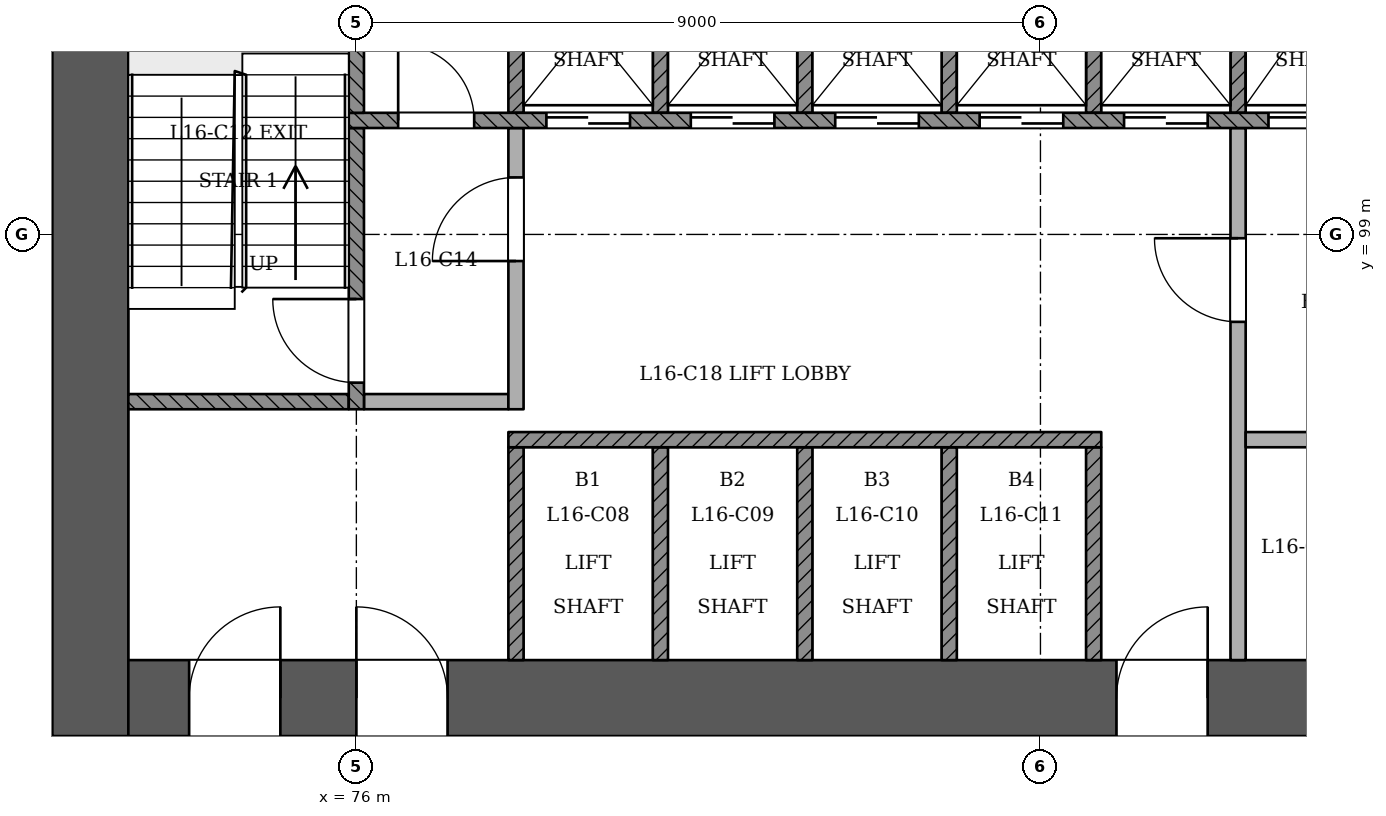
"""IFC4 building model, lengths in metres.
Left out: names, types, materials, properties, quantities, classifications, styles, units other than length and angle.
Written with IfcOpenShell. Run it as: python <this file> out.ifc"""

import sys

from ifc_helpers import new_model, si_unit, direction, frame, frame_2d, origin, place, context, subcontext, project, spatial, rectangle, extrude, element, fill, save


model = new_model("IFC4")
c1 = context("Model", 3, precision=1e-05, world=origin(), true_north=direction((0.0, 1.0)))
c2 = subcontext(c1, "Body", "Model", "MODEL_VIEW")
j1 = project(units=[si_unit("LENGTHUNIT", "METRE"), si_unit("PLANEANGLEUNIT", "RADIAN")], contexts=[c1])
p1 = place(None, origin())
s1 = spatial("IfcSite", under=j1, at=p1, CompositionType="ELEMENT")
p2 = place(p1, origin())
s2 = spatial("IfcBuilding", under=s1, at=p2, CompositionType="ELEMENT")
p3 = place(p2, frame((0.0, 0.0, 66.6)))
s3 = spatial("IfcBuildingStorey", under=s2, at=p3, CompositionType="ELEMENT", Elevation=66.6)
p4 = place(p3, frame((72.5, 92.9, 0.0), z_axis=(0.0, 0.0, 1.0), x_axis=(1.0, 0.0, 0.0)))
e1 = element("IfcWall", 1, at=p4, inside=s3, PredefinedType="SHEAR", context=c2, shape_type="SweptSolid", body=[
    extrude(rectangle(XDim=25.5, YDim=1.0, at=frame_2d((12.75, 0.0))), origin(), (0.0, 0.0, 1.0), 3.6),
])
p5 = place(p4, frame((1.3, 0.0, 0.0)))
e2 = element("IfcOpeningElement", 2, at=p5, cuts=e1, PredefinedType="OPENING", context=c2, shape_type="SweptSolid", body=[
    extrude(rectangle(XDim=1.2, YDim=2.1, at=frame_2d((0.6, 1.05))), frame((0.0, 0.51, 0.0), z_axis=(0.0, -1.0, 0.0), x_axis=(1.0, 0.0, 0.0)), (0.0, 0.0, 1.0), 1.021),
])
p6 = place(p4, frame((3.5, 0.0, 0.0)))
e3 = element("IfcOpeningElement", 3, at=p6, cuts=e1, PredefinedType="OPENING", context=c2, shape_type="SweptSolid", body=[
    extrude(rectangle(XDim=1.2, YDim=2.1, at=frame_2d((0.6, 1.05))), frame((0.0, 0.51, 0.0), z_axis=(0.0, -1.0, 0.0), x_axis=(1.0, 0.0, 0.0)), (0.0, 0.0, 1.0), 1.021),
])
p7 = place(p4, frame((13.5, 0.0, 0.0)))
e4 = element("IfcOpeningElement", 4, at=p7, cuts=e1, PredefinedType="OPENING", context=c2, shape_type="SweptSolid", body=[
    extrude(rectangle(XDim=1.2, YDim=2.1, at=frame_2d((0.6, 1.05))), frame((0.0, 0.51, 0.0), z_axis=(0.0, -1.0, 0.0), x_axis=(1.0, 0.0, 0.0)), (0.0, 0.0, 1.0), 1.021),
])
p8 = place(p4, frame((16.363, 0.0, 0.0)))
e5 = element("IfcOpeningElement", 5, at=p8, cuts=e1, PredefinedType="OPENING", context=c2, shape_type="SweptSolid", body=[
    extrude(rectangle(XDim=1.0, YDim=2.1, at=frame_2d((0.5, 1.05))), frame((0.0, 0.51, 0.0), z_axis=(0.0, -1.0, 0.0), x_axis=(1.0, 0.0, 0.0)), (0.0, 0.0, 1.0), 1.021),
])
p9 = place(p4, frame((19.8, 0.0, 0.0)))
e6 = element("IfcOpeningElement", 6, at=p9, cuts=e1, PredefinedType="OPENING", context=c2, shape_type="SweptSolid", body=[
    extrude(rectangle(XDim=1.0, YDim=2.1, at=frame_2d((0.5, 1.05))), frame((0.0, 0.51, 0.0), z_axis=(0.0, -1.0, 0.0), x_axis=(1.0, 0.0, 0.0)), (0.0, 0.0, 1.0), 1.021),
])
p10 = place(p4, frame((22.788, 0.0, 0.0)))
e7 = element("IfcOpeningElement", 7, at=p10, cuts=e1, PredefinedType="OPENING", context=c2, shape_type="SweptSolid", body=[
    extrude(rectangle(XDim=1.0, YDim=2.1, at=frame_2d((0.5, 1.05))), frame((0.0, 0.51, 0.0), z_axis=(0.0, -1.0, 0.0), x_axis=(1.0, 0.0, 0.0)), (0.0, 0.0, 1.0), 1.021),
])
p11 = place(p3, frame((72.5, 103.9, 0.0), z_axis=(0.0, 0.0, 1.0), x_axis=(0.0, -1.0, 0.0)))
e8 = element("IfcWall", 8, at=p11, inside=s3, PredefinedType="SHEAR", context=c2, shape_type="SweptSolid", body=[
    extrude(rectangle(XDim=11.5, YDim=1.0, at=frame_2d((5.75, 0.0))), origin(), (0.0, 0.0, 1.0), 3.6),
])
p12 = place(p3, frame((62.458, 97.093, 0.0), z_axis=(0.0, 0.0, 1.0), x_axis=(0.499998802074, -0.866026095406, 0.0)))
e9 = element("IfcWall", 9, at=p12, inside=s3, PredefinedType="PARTITIONING", context=c2, shape_type="SweptSolid", body=[
    extrude(rectangle(XDim=43.437, YDim=0.15, at=frame_2d((21.719, 0.0))), origin(), (0.0, 0.0, 1.0), 2.7),
])
p13 = place(p12, frame((0.286, 0.0, 0.0)))
e10 = element("IfcOpeningElement", 10, at=p13, cuts=e9, PredefinedType="OPENING", context=c2, shape_type="SweptSolid", body=[
    extrude(rectangle(XDim=1.2, YDim=2.1, at=frame_2d((0.6, 1.05))), frame((0.0, 0.085, 0.0), z_axis=(0.0, -1.0, 0.0), x_axis=(1.0, 0.0, 0.0)), (0.0, 0.0, 1.0), 0.171),
])
p14 = place(p12, frame((12.13, 0.0, 0.0)))
e11 = element("IfcOpeningElement", 11, at=p14, cuts=e9, PredefinedType="OPENING", context=c2, shape_type="SweptSolid", body=[
    extrude(rectangle(XDim=1.2, YDim=2.1, at=frame_2d((0.6, 1.05))), frame((0.0, 0.085, 0.0), z_axis=(0.0, -1.0, 0.0), x_axis=(1.0, 0.0, 0.0)), (0.0, 0.0, 1.0), 0.171),
])
p15 = place(p12, frame((18.98, 0.0, 0.0)))
e12 = element("IfcOpeningElement", 12, at=p15, cuts=e9, PredefinedType="OPENING", context=c2, shape_type="SweptSolid", body=[
    extrude(rectangle(XDim=1.0, YDim=2.1, at=frame_2d((0.5, 1.05))), frame((0.0, 0.085, 0.0), z_axis=(0.0, -1.0, 0.0), x_axis=(1.0, 0.0, 0.0)), (0.0, 0.0, 1.0), 0.171),
])
p16 = place(p12, frame((27.88, 0.0, 0.0)))
e13 = element("IfcOpeningElement", 13, at=p16, cuts=e9, PredefinedType="OPENING", context=c2, shape_type="SweptSolid", body=[
    extrude(rectangle(XDim=1.2, YDim=2.1, at=frame_2d((0.6, 1.05))), frame((0.0, 0.085, 0.0), z_axis=(0.0, -1.0, 0.0), x_axis=(1.0, 0.0, 0.0)), (0.0, 0.0, 1.0), 0.171),
])
p17 = place(p12, frame((38.745, 0.0, 0.0)))
e14 = element("IfcOpeningElement", 14, at=p17, cuts=e9, PredefinedType="OPENING", context=c2, shape_type="SweptSolid", body=[
    extrude(rectangle(XDim=1.2, YDim=2.1, at=frame_2d((0.6, 1.05))), frame((0.0, 0.085, 0.0), z_axis=(0.0, -1.0, 0.0), x_axis=(1.0, 0.0, 0.0)), (0.0, 0.0, 1.0), 0.171),
])
p18 = place(p3, frame((85.824, 59.475, 0.0), z_axis=(0.0, 0.0, 1.0), x_axis=(0.499998498473, 0.86602627069, 0.0)))
e15 = element("IfcWall", 15, at=p18, inside=s3, PredefinedType="PARTITIONING", context=c2, shape_type="SweptSolid", body=[
    extrude(rectangle(XDim=42.924, YDim=0.15, at=frame_2d((21.462, 0.0))), origin(), (0.0, 0.0, 1.0), 2.7),
])
p19 = place(p18, frame((3.492, 0.0, 0.0)))
e16 = element("IfcOpeningElement", 16, at=p19, cuts=e15, PredefinedType="OPENING", context=c2, shape_type="SweptSolid", body=[
    extrude(rectangle(XDim=1.2, YDim=2.1, at=frame_2d((0.6, 1.05))), frame((0.0, 0.085, 0.0), z_axis=(0.0, -1.0, 0.0), x_axis=(1.0, 0.0, 0.0)), (0.0, 0.0, 1.0), 0.171),
])
p20 = place(p18, frame((14.357, 0.0, 0.0)))
e17 = element("IfcOpeningElement", 17, at=p20, cuts=e15, PredefinedType="OPENING", context=c2, shape_type="SweptSolid", body=[
    extrude(rectangle(XDim=1.2, YDim=2.1, at=frame_2d((0.6, 1.05))), frame((0.0, 0.085, 0.0), z_axis=(0.0, -1.0, 0.0), x_axis=(1.0, 0.0, 0.0)), (0.0, 0.0, 1.0), 0.171),
])
p21 = place(p18, frame((27.857, 0.0, 0.0)))
e18 = element("IfcOpeningElement", 18, at=p21, cuts=e15, PredefinedType="OPENING", context=c2, shape_type="SweptSolid", body=[
    extrude(rectangle(XDim=1.2, YDim=2.1, at=frame_2d((0.6, 1.05))), frame((0.0, 0.085, 0.0), z_axis=(0.0, -1.0, 0.0), x_axis=(1.0, 0.0, 0.0)), (0.0, 0.0, 1.0), 0.171),
])
p22 = place(p18, frame((38.721, 0.0, 0.0)))
e19 = element("IfcOpeningElement", 19, at=p22, cuts=e15, PredefinedType="OPENING", context=c2, shape_type="SweptSolid", body=[
    extrude(rectangle(XDim=1.2, YDim=2.1, at=frame_2d((0.6, 1.05))), frame((0.0, 0.085, 0.0), z_axis=(0.0, -1.0, 0.0), x_axis=(1.0, 0.0, 0.0)), (0.0, 0.0, 1.0), 0.171),
])
for number, where, z_axis, x_axis in (
    (20, (78.1, 93.4, 0.0), (0.0, 0.0, 1.0), (0.0, 1.0, 0.0)),
    (21, (80.0, 93.4, 0.0), (0.0, 0.0, 1.0), (0.0, 1.0, 0.0)),
    (22, (81.9, 93.4, 0.0), (0.0, 0.0, 1.0), (0.0, 1.0, 0.0)),
    (23, (83.8, 93.4, 0.0), (0.0, 0.0, 1.0), (0.0, 1.0, 0.0)),
    (24, (85.7, 93.4, 0.0), (0.0, 0.0, 1.0), (0.0, 1.0, 0.0)),
):
    element("IfcWall", number, at=place(p3, frame(where, z_axis=z_axis, x_axis=x_axis)), inside=s3, PredefinedType="SOLIDWALL", context=c2, shape_type="SweptSolid", body=[
        extrude(rectangle(XDim=2.8, YDim=0.2, at=frame_2d((1.4, 0.0))), origin(), (0.0, 0.0, 1.0), 3.1),
    ])
p23 = place(p3, frame((87.6, 93.4, 0.0), z_axis=(0.0, 0.0, 1.0), x_axis=(0.0, 1.0, 0.0)))
e25 = element("IfcWall", 25, at=p23, inside=s3, PredefinedType="PARTITIONING", context=c2, shape_type="SweptSolid", body=[
    extrude(rectangle(XDim=7.0, YDim=0.2, at=frame_2d((3.5, 0.0))), origin(), (0.0, 0.0, 1.0), 3.1),
])
p24 = place(p23, frame((4.45, 0.0, 0.0)))
e26 = element("IfcOpeningElement", 26, at=p24, cuts=e25, PredefinedType="OPENING", context=c2, shape_type="SweptSolid", body=[
    extrude(rectangle(XDim=1.1, YDim=2.1, at=frame_2d((0.55, 1.05))), frame((0.0, 0.11, 0.0), z_axis=(0.0, -1.0, 0.0), x_axis=(1.0, 0.0, 0.0)), (0.0, 0.0, 1.0), 0.221),
])
p25 = place(p3, frame((78.0, 96.3, 0.0), z_axis=(0.0, 0.0, 1.0), x_axis=(1.0, 0.0, 0.0)))
e27 = element("IfcWall", 27, at=p25, inside=s3, PredefinedType="SOLIDWALL", context=c2, shape_type="SweptSolid", body=[
    extrude(rectangle(XDim=7.8, YDim=0.2, at=frame_2d((3.9, 0.0))), origin(), (0.0, 0.0, 1.0), 3.1),
])
p26 = place(p3, frame((87.7, 96.3, 0.0), z_axis=(0.0, 0.0, 1.0), x_axis=(1.0, 0.0, 0.0)))
e28 = element("IfcWall", 28, at=p26, inside=s3, PredefinedType="PARTITIONING", context=c2, shape_type="SweptSolid", body=[
    extrude(rectangle(XDim=3.6, YDim=0.2, at=frame_2d((1.8, 0.0))), origin(), (0.0, 0.0, 1.0), 3.1),
])
p27 = place(p3, frame((73.0, 96.8, 0.0), z_axis=(0.0, 0.0, 1.0), x_axis=(1.0, 0.0, 0.0)))
e29 = element("IfcWall", 29, at=p27, inside=s3, PredefinedType="SOLIDWALL", context=c2, shape_type="SweptSolid", body=[
    extrude(rectangle(XDim=2.9, YDim=0.2, at=frame_2d((1.45, 0.0))), origin(), (0.0, 0.0, 1.0), 3.1),
])
p28 = place(p3, frame((76.0, 96.7, 0.0), z_axis=(0.0, 0.0, 1.0), x_axis=(0.0, 1.0, 0.0)))
e30 = element("IfcWall", 30, at=p28, inside=s3, PredefinedType="SOLIDWALL", context=c2, shape_type="SweptSolid", body=[
    extrude(rectangle(XDim=3.7, YDim=0.2, at=frame_2d((1.85, 0.0))), origin(), (0.0, 0.0, 1.0), 3.1),
])
p29 = place(p28, frame((0.35, 0.0, 0.0)))
e31 = element("IfcOpeningElement", 31, at=p29, cuts=e30, PredefinedType="OPENING", context=c2, shape_type="SweptSolid", body=[
    extrude(rectangle(XDim=1.1, YDim=2.1, at=frame_2d((0.55, 1.05))), frame((0.0, 0.11, 0.0), z_axis=(0.0, -1.0, 0.0), x_axis=(1.0, 0.0, 0.0)), (0.0, 0.0, 1.0), 0.221),
])
p30 = place(p3, frame((76.1, 96.8, 0.0), z_axis=(0.0, 0.0, 1.0), x_axis=(1.0, 0.0, 0.0)))
e32 = element("IfcWall", 32, at=p30, inside=s3, PredefinedType="PARTITIONING", context=c2, shape_type="SweptSolid", body=[
    extrude(rectangle(XDim=1.9, YDim=0.2, at=frame_2d((0.95, 0.0))), origin(), (0.0, 0.0, 1.0), 3.1),
])
p31 = place(p3, frame((78.1, 96.7, 0.0), z_axis=(0.0, 0.0, 1.0), x_axis=(0.0, 1.0, 0.0)))
e33 = element("IfcWall", 33, at=p31, inside=s3, PredefinedType="PARTITIONING", context=c2, shape_type="SweptSolid", body=[
    extrude(rectangle(XDim=3.7, YDim=0.2, at=frame_2d((1.85, 0.0))), origin(), (0.0, 0.0, 1.0), 3.1),
])
p32 = place(p31, frame((1.95, 0.0, 0.0)))
e34 = element("IfcOpeningElement", 34, at=p32, cuts=e33, PredefinedType="OPENING", context=c2, shape_type="SweptSolid", body=[
    extrude(rectangle(XDim=1.1, YDim=2.1, at=frame_2d((0.55, 1.05))), frame((0.0, 0.11, 0.0), z_axis=(0.0, -1.0, 0.0), x_axis=(1.0, 0.0, 0.0)), (0.0, 0.0, 1.0), 0.221),
])
p33 = place(p3, frame((75.9, 100.5, 0.0), z_axis=(0.0, 0.0, 1.0), x_axis=(1.0, 0.0, 0.0)))
e35 = element("IfcWall", 35, at=p33, inside=s3, PredefinedType="SOLIDWALL", context=c2, shape_type="SweptSolid", body=[
    extrude(rectangle(XDim=18.2, YDim=0.2, at=frame_2d((9.1, 0.0))), origin(), (0.0, 0.0, 1.0), 3.1),
])
p34 = place(p33, frame((2.6, 0.0, 0.0)))
e36 = element("IfcOpeningElement", 36, at=p34, cuts=e35, PredefinedType="OPENING", context=c2, shape_type="SweptSolid", body=[
    extrude(rectangle(XDim=1.1, YDim=2.1, at=frame_2d((0.55, 1.05))), frame((0.0, 0.11, 0.0), z_axis=(0.0, -1.0, 0.0), x_axis=(1.0, 0.0, 0.0)), (0.0, 0.0, 1.0), 0.221),
])
p35 = place(p33, frame((4.5, 0.0, 0.0)))
e37 = element("IfcOpeningElement", 37, at=p35, cuts=e35, PredefinedType="OPENING", context=c2, shape_type="SweptSolid", body=[
    extrude(rectangle(XDim=1.1, YDim=2.1, at=frame_2d((0.55, 1.05))), frame((0.0, 0.11, 0.0), z_axis=(0.0, -1.0, 0.0), x_axis=(1.0, 0.0, 0.0)), (0.0, 0.0, 1.0), 0.221),
])
p36 = place(p33, frame((6.4, 0.0, 0.0)))
e38 = element("IfcOpeningElement", 38, at=p36, cuts=e35, PredefinedType="OPENING", context=c2, shape_type="SweptSolid", body=[
    extrude(rectangle(XDim=1.1, YDim=2.1, at=frame_2d((0.55, 1.05))), frame((0.0, 0.11, 0.0), z_axis=(0.0, -1.0, 0.0), x_axis=(1.0, 0.0, 0.0)), (0.0, 0.0, 1.0), 0.221),
])
p37 = place(p33, frame((8.3, 0.0, 0.0)))
e39 = element("IfcOpeningElement", 39, at=p37, cuts=e35, PredefinedType="OPENING", context=c2, shape_type="SweptSolid", body=[
    extrude(rectangle(XDim=1.1, YDim=2.1, at=frame_2d((0.55, 1.05))), frame((0.0, 0.11, 0.0), z_axis=(0.0, -1.0, 0.0), x_axis=(1.0, 0.0, 0.0)), (0.0, 0.0, 1.0), 0.221),
])
p38 = place(p33, frame((10.2, 0.0, 0.0)))
e40 = element("IfcOpeningElement", 40, at=p38, cuts=e35, PredefinedType="OPENING", context=c2, shape_type="SweptSolid", body=[
    extrude(rectangle(XDim=1.1, YDim=2.1, at=frame_2d((0.55, 1.05))), frame((0.0, 0.11, 0.0), z_axis=(0.0, -1.0, 0.0), x_axis=(1.0, 0.0, 0.0)), (0.0, 0.0, 1.0), 0.221),
])
p39 = place(p33, frame((12.1, 0.0, 0.0)))
e41 = element("IfcOpeningElement", 41, at=p39, cuts=e35, PredefinedType="OPENING", context=c2, shape_type="SweptSolid", body=[
    extrude(rectangle(XDim=1.1, YDim=2.1, at=frame_2d((0.55, 1.05))), frame((0.0, 0.11, 0.0), z_axis=(0.0, -1.0, 0.0), x_axis=(1.0, 0.0, 0.0)), (0.0, 0.0, 1.0), 0.221),
])
p40 = place(p33, frame((14.0, 0.0, 0.0)))
e42 = element("IfcOpeningElement", 42, at=p40, cuts=e35, PredefinedType="OPENING", context=c2, shape_type="SweptSolid", body=[
    extrude(rectangle(XDim=1.1, YDim=2.1, at=frame_2d((0.55, 1.05))), frame((0.0, 0.11, 0.0), z_axis=(0.0, -1.0, 0.0), x_axis=(1.0, 0.0, 0.0)), (0.0, 0.0, 1.0), 0.221),
])
p41 = place(p33, frame((0.65, 0.0, 0.0)))
e43 = element("IfcOpeningElement", 43, at=p41, cuts=e35, PredefinedType="OPENING", context=c2, shape_type="SweptSolid", body=[
    extrude(rectangle(XDim=1.0, YDim=2.1, at=frame_2d((0.5, 1.05))), frame((0.0, 0.11, 0.0), z_axis=(0.0, -1.0, 0.0), x_axis=(1.0, 0.0, 0.0)), (0.0, 0.0, 1.0), 0.221),
])
p42 = place(p33, frame((16.3, 0.0, 0.0)))
e44 = element("IfcOpeningElement", 44, at=p42, cuts=e35, PredefinedType="OPENING", context=c2, shape_type="SweptSolid", body=[
    extrude(rectangle(XDim=1.0, YDim=2.1, at=frame_2d((0.5, 1.05))), frame((0.0, 0.11, 0.0), z_axis=(0.0, -1.0, 0.0), x_axis=(1.0, 0.0, 0.0)), (0.0, 0.0, 1.0), 0.221),
])
for number, where, z_axis, x_axis in (
    (45, (76.0, 100.6, 0.0), (0.0, 0.0, 1.0), (0.0, 1.0, 0.0)),
    (46, (78.1, 100.6, 0.0), (0.0, 0.0, 1.0), (0.0, 1.0, 0.0)),
    (47, (80.0, 100.6, 0.0), (0.0, 0.0, 1.0), (0.0, 1.0, 0.0)),
    (48, (81.9, 100.6, 0.0), (0.0, 0.0, 1.0), (0.0, 1.0, 0.0)),
    (49, (83.8, 100.6, 0.0), (0.0, 0.0, 1.0), (0.0, 1.0, 0.0)),
    (50, (85.7, 100.6, 0.0), (0.0, 0.0, 1.0), (0.0, 1.0, 0.0)),
    (51, (87.6, 100.6, 0.0), (0.0, 0.0, 1.0), (0.0, 1.0, 0.0)),
):
    element("IfcWall", number, at=place(p3, frame(where, z_axis=z_axis, x_axis=x_axis)), inside=s3, PredefinedType="SOLIDWALL", context=c2, shape_type="SweptSolid", body=[
        extrude(rectangle(XDim=2.8, YDim=0.2, at=frame_2d((1.4, 0.0))), origin(), (0.0, 0.0, 1.0), 3.1),
    ])
p43 = place(p34, origin())
e52 = element("IfcDoor", 52, at=p43, inside=s3, OperationType="SLIDING_TO_RIGHT", PredefinedType="NOTDEFINED", context=c2, shape_type="SweptSolid", body=[
    extrude(rectangle(XDim=1.1, YDim=2.1, at=frame_2d((0.55, 1.05))), frame((0.0, 0.025, 0.0), z_axis=(0.0, -1.0, 0.0), x_axis=(1.0, 0.0, 0.0)), (0.0, 0.0, 1.0), 0.05),
])
fill(e36, e52)
p44 = place(p35, origin())
e53 = element("IfcDoor", 53, at=p44, inside=s3, OperationType="SLIDING_TO_LEFT", PredefinedType="NOTDEFINED", context=c2, shape_type="SweptSolid", body=[
    extrude(rectangle(XDim=1.1, YDim=2.1, at=frame_2d((0.55, 1.05))), frame((0.0, 0.025, 0.0), z_axis=(0.0, -1.0, 0.0), x_axis=(1.0, 0.0, 0.0)), (0.0, 0.0, 1.0), 0.05),
])
fill(e37, e53)
p45 = place(p36, origin())
e54 = element("IfcDoor", 54, at=p45, inside=s3, OperationType="SLIDING_TO_RIGHT", PredefinedType="NOTDEFINED", context=c2, shape_type="SweptSolid", body=[
    extrude(rectangle(XDim=1.1, YDim=2.1, at=frame_2d((0.55, 1.05))), frame((0.0, 0.025, 0.0), z_axis=(0.0, -1.0, 0.0), x_axis=(1.0, 0.0, 0.0)), (0.0, 0.0, 1.0), 0.05),
])
fill(e38, e54)
p46 = place(p37, origin())
e55 = element("IfcDoor", 55, at=p46, inside=s3, OperationType="SLIDING_TO_LEFT", PredefinedType="NOTDEFINED", context=c2, shape_type="SweptSolid", body=[
    extrude(rectangle(XDim=1.1, YDim=2.1, at=frame_2d((0.55, 1.05))), frame((0.0, 0.025, 0.0), z_axis=(0.0, -1.0, 0.0), x_axis=(1.0, 0.0, 0.0)), (0.0, 0.0, 1.0), 0.05),
])
fill(e39, e55)
p47 = place(p38, origin())
e56 = element("IfcDoor", 56, at=p47, inside=s3, OperationType="SLIDING_TO_RIGHT", PredefinedType="NOTDEFINED", context=c2, shape_type="SweptSolid", body=[
    extrude(rectangle(XDim=1.1, YDim=2.1, at=frame_2d((0.55, 1.05))), frame((0.0, 0.025, 0.0), z_axis=(0.0, -1.0, 0.0), x_axis=(1.0, 0.0, 0.0)), (0.0, 0.0, 1.0), 0.05),
])
fill(e40, e56)
p48 = place(p39, origin())
e57 = element("IfcDoor", 57, at=p48, inside=s3, OperationType="SLIDING_TO_RIGHT", PredefinedType="NOTDEFINED", context=c2, shape_type="SweptSolid", body=[
    extrude(rectangle(XDim=1.1, YDim=2.1, at=frame_2d((0.55, 1.05))), frame((0.0, 0.025, 0.0), z_axis=(0.0, -1.0, 0.0), x_axis=(1.0, 0.0, 0.0)), (0.0, 0.0, 1.0), 0.05),
])
fill(e41, e57)
p49 = place(p29, origin())
e58 = element("IfcDoor", 58, at=p49, inside=s3, OperationType="SINGLE_SWING_RIGHT", PredefinedType="NOTDEFINED", context=c2, shape_type="SweptSolid", body=[
    extrude(rectangle(XDim=1.1, YDim=2.1, at=frame_2d((0.55, 1.05))), frame((0.0, 0.025, 0.0), z_axis=(0.0, -1.0, 0.0), x_axis=(1.0, 0.0, 0.0)), (0.0, 0.0, 1.0), 0.05),
])
fill(e31, e58)
p50 = place(p32, origin())
e59 = element("IfcDoor", 59, at=p50, inside=s3, OperationType="SINGLE_SWING_LEFT", PredefinedType="NOTDEFINED", context=c2, shape_type="SweptSolid", body=[
    extrude(rectangle(XDim=1.1, YDim=2.1, at=frame_2d((0.55, 1.05))), frame((0.0, 0.025, 0.0), z_axis=(0.0, -1.0, 0.0), x_axis=(1.0, 0.0, 0.0)), (0.0, 0.0, 1.0), 0.05),
])
fill(e34, e59)
p51 = place(p24, origin())
e60 = element("IfcDoor", 60, at=p51, inside=s3, OperationType="SINGLE_SWING_RIGHT", PredefinedType="NOTDEFINED", context=c2, shape_type="SweptSolid", body=[
    extrude(rectangle(XDim=1.1, YDim=2.1, at=frame_2d((0.55, 1.05))), frame((0.0, 0.025, 0.0), z_axis=(0.0, -1.0, 0.0), x_axis=(1.0, 0.0, 0.0)), (0.0, 0.0, 1.0), 0.05),
])
fill(e26, e60)
p52 = place(p5, origin())
e61 = element("IfcDoor", 61, at=p52, inside=s3, OperationType="SINGLE_SWING_RIGHT", PredefinedType="NOTDEFINED", context=c2, shape_type="SweptSolid", body=[
    extrude(rectangle(XDim=1.2, YDim=2.1, at=frame_2d((0.6, 1.05))), frame((0.0, 0.025, 0.0), z_axis=(0.0, -1.0, 0.0), x_axis=(1.0, 0.0, 0.0)), (0.0, 0.0, 1.0), 0.05),
])
fill(e2, e61)
p53 = place(p6, origin())
e62 = element("IfcDoor", 62, at=p53, inside=s3, OperationType="SINGLE_SWING_LEFT", PredefinedType="NOTDEFINED", context=c2, shape_type="SweptSolid", body=[
    extrude(rectangle(XDim=1.2, YDim=2.1, at=frame_2d((0.6, 1.05))), frame((0.0, 0.025, 0.0), z_axis=(0.0, -1.0, 0.0), x_axis=(1.0, 0.0, 0.0)), (0.0, 0.0, 1.0), 0.05),
])
fill(e3, e62)
p54 = place(p7, origin())
e63 = element("IfcDoor", 63, at=p54, inside=s3, OperationType="SINGLE_SWING_RIGHT", PredefinedType="NOTDEFINED", context=c2, shape_type="SweptSolid", body=[
    extrude(rectangle(XDim=1.2, YDim=2.1, at=frame_2d((0.6, 1.05))), frame((0.0, 0.025, 0.0), z_axis=(0.0, -1.0, 0.0), x_axis=(1.0, 0.0, 0.0)), (0.0, 0.0, 1.0), 0.05),
])
fill(e4, e63)
p55 = place(p41, origin())
e64 = element("IfcDoor", 64, at=p55, inside=s3, OperationType="SINGLE_SWING_LEFT", PredefinedType="NOTDEFINED", context=c2, shape_type="SweptSolid", body=[
    extrude(rectangle(XDim=1.0, YDim=2.1, at=frame_2d((0.5, 1.05))), frame((0.0, 0.025, 0.0), z_axis=(0.0, -1.0, 0.0), x_axis=(1.0, 0.0, 0.0)), (0.0, 0.0, 1.0), 0.05),
])
fill(e43, e64)
save(model, sys.argv[1])
